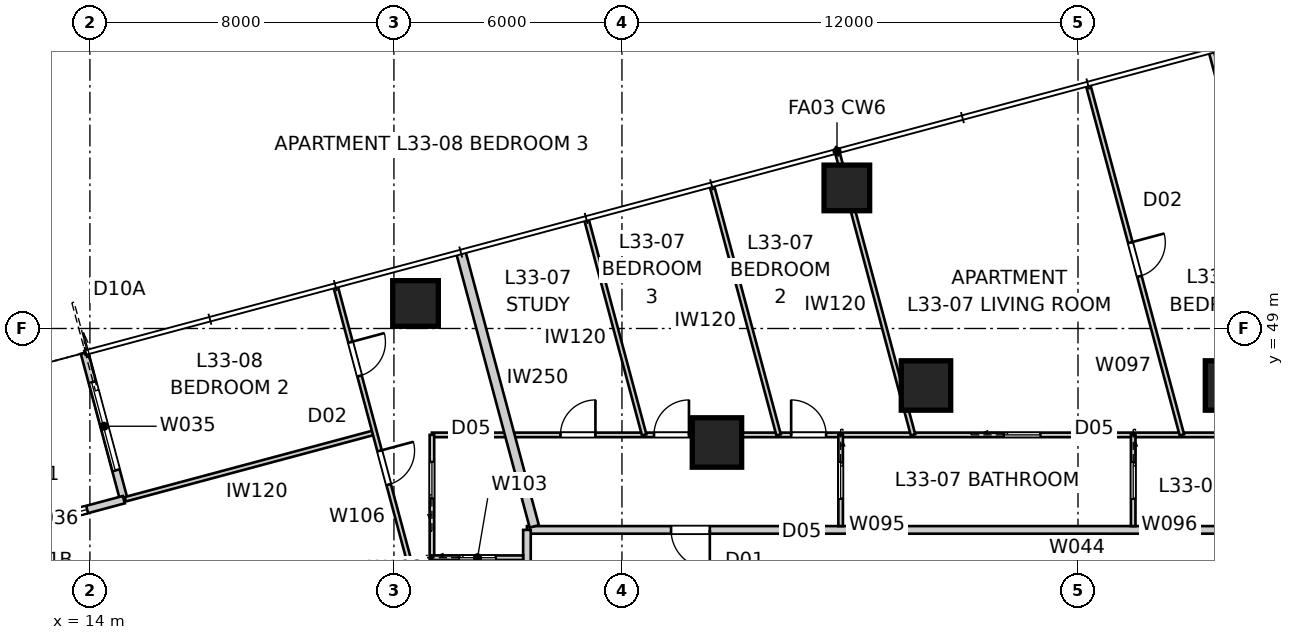
"""IFC4 building model, lengths in metres.
Left out: names, types, materials, properties, quantities, classifications, styles, units other than length and angle.
Written with IfcOpenShell. Run it as: python <this file> out.ifc"""

import sys

from ifc_helpers import new_model, si_unit, direction, frame, frame_2d, origin, origin_2d, place, context, subcontext, project, spatial, rectangle, extrude, element, fill, save


model = new_model("IFC4")
c1 = context("Model", 3, precision=1e-05, world=origin(), true_north=direction((0.0, 1.0)))
c2 = subcontext(c1, "Body", "Model", "MODEL_VIEW")
j1 = project(units=[si_unit("LENGTHUNIT", "METRE"), si_unit("PLANEANGLEUNIT", "RADIAN")], contexts=[c1])
p1 = place(None, origin())
s1 = spatial("IfcSite", under=j1, at=p1, CompositionType="ELEMENT")
p2 = place(p1, origin())
s2 = spatial("IfcBuilding", under=s1, at=p2, CompositionType="ELEMENT")
p3 = place(p2, frame((0.0, 0.0, 121.8)))
s3 = spatial("IfcBuildingStorey", under=s2, at=p3, CompositionType="ELEMENT", Elevation=121.8)
for number, where, z_axis, x_axis in (
    (1, (33.918, 52.699, 0.0), (0.0, 0.0, 1.0), (1.0, 0.0, 0.0)),
    (2, (22.568, 49.658, 0.0), (0.0, 0.0, 1.0), (1.0, 0.0, 0.0)),
):
    element("IfcColumn", number, at=place(p3, frame(where, z_axis=z_axis, x_axis=x_axis)), inside=s3, PredefinedType="COLUMN", context=c2, shape_type="SweptSolid", body=[
        extrude(rectangle(XDim=1.2, YDim=1.2, at=origin_2d()), origin(), (0.0, 0.0, 1.0), 3.4),
    ])
for number, where, z_axis, x_axis in (
    (3, (44.0, 47.5, 0.0), (0.0, 0.0, 1.0), (1.0, 0.0, 0.0)),
    (4, (36.0, 47.5, 0.0), (0.0, 0.0, 1.0), (1.0, 0.0, 0.0)),
    (5, (30.5, 46.0, 0.0), (0.0, 0.0, 1.0), (1.0, 0.0, 0.0)),
):
    element("IfcColumn", number, at=place(p3, frame(where, z_axis=z_axis, x_axis=x_axis)), inside=s3, PredefinedType="COLUMN", context=c2, shape_type="SweptSolid", body=[
        extrude(rectangle(XDim=1.3, YDim=1.3, at=origin_2d()), origin(), (0.0, 0.0, 1.0), 3.4),
    ])
p4 = place(p3, frame((13.857, 48.359, 0.0), z_axis=(0.0, 0.0, 1.0), x_axis=(0.258843877716, -0.965919172068, 0.0)))
e6 = element("IfcWall", 6, at=p4, inside=s3, PredefinedType="SOLIDWALL", context=c2, shape_type="SweptSolid", body=[
    extrude(rectangle(XDim=4.0, YDim=0.2, at=frame_2d((2.0, 0.0))), origin(), (0.0, 0.0, 1.0), 3.25),
])
p5 = place(p4, frame((0.8, 0.0, 0.0)))
e7 = element("IfcOpeningElement", 7, at=p5, cuts=e6, PredefinedType="OPENING", context=c2, shape_type="SweptSolid", body=[
    extrude(rectangle(XDim=2.4, YDim=2.1, at=frame_2d((1.2, 1.05))), frame((0.0, 0.11, 0.0), z_axis=(0.0, -1.0, 0.0), x_axis=(1.0, 0.0, 0.0)), (0.0, 0.0, 1.0), 0.22),
])
p6 = place(p3, frame((14.893, 44.496, 0.0), z_axis=(0.0, 0.0, 1.0), x_axis=(-0.965934430412, -0.258786931944, 0.0)))
e8 = element("IfcWall", 8, at=p6, inside=s3, PredefinedType="SOLIDWALL", context=c2, shape_type="SweptSolid", body=[
    extrude(rectangle(XDim=4.0, YDim=0.2, at=frame_2d((2.0, 0.0))), origin(), (0.0, 0.0, 1.0), 3.25),
])
p7 = place(p6, frame((1.0, 0.0, 0.45)))
e9 = element("IfcOpeningElement", 9, at=p7, cuts=e8, PredefinedType="OPENING", context=c2, shape_type="SweptSolid", body=[
    extrude(rectangle(XDim=2.0, YDim=1.8, at=frame_2d((1.0, 0.9))), frame((0.0, 0.11, 0.0), z_axis=(0.0, -1.0, 0.0), x_axis=(1.0, 0.0, 0.0)), (0.0, 0.0, 1.0), 0.22),
])
p8 = place(p3, frame((52.52, 43.7, 0.0), z_axis=(0.0, 0.0, 1.0), x_axis=(-1.0, 0.0, 0.0)))
e10 = element("IfcWall", 10, at=p8, inside=s3, PredefinedType="PARTITIONING", context=c2, shape_type="SweptSolid", body=[
    extrude(rectangle(XDim=27.02, YDim=0.2, at=frame_2d((13.51, 0.0))), origin(), (0.0, 0.0, 1.0), 3.25),
])
p9 = place(p8, frame((22.208, 0.0, 0.0)))
e11 = element("IfcOpeningElement", 11, at=p9, cuts=e10, PredefinedType="OPENING", context=c2, shape_type="SweptSolid", body=[
    extrude(rectangle(XDim=1.02, YDim=2.34, at=frame_2d((0.51, 1.17))), frame((0.0, 0.11, 0.0), z_axis=(0.0, -1.0, 0.0), x_axis=(1.0, 0.0, 0.0)), (0.0, 0.0, 1.0), 0.22),
])
p10 = place(p8, frame((1.856, 0.0, 0.0)))
e12 = element("IfcOpeningElement", 12, at=p10, cuts=e10, PredefinedType="OPENING", context=c2, shape_type="SweptSolid", body=[
    extrude(rectangle(XDim=1.02, YDim=2.34, at=frame_2d((0.51, 1.17))), frame((0.0, 0.11, 0.0), z_axis=(0.0, -1.0, 0.0), x_axis=(1.0, 0.0, 0.0)), (0.0, 0.0, 1.0), 0.22),
])
p11 = place(p3, frame((25.5, 43.7, 0.0), z_axis=(0.0, 0.0, 1.0), x_axis=(0.0, -1.0, 0.0)))
e13 = element("IfcWall", 13, at=p11, inside=s3, PredefinedType="PARTITIONING", context=c2, shape_type="SweptSolid", body=[
    extrude(rectangle(XDim=28.2, YDim=0.2, at=frame_2d((14.1, 0.0))), origin(), (0.0, 0.0, 1.0), 3.25),
])
p12 = place(p11, frame((8.742, 0.0, 0.0)))
e14 = element("IfcOpeningElement", 14, at=p12, cuts=e13, PredefinedType="OPENING", context=c2, shape_type="SweptSolid", body=[
    extrude(rectangle(XDim=1.02, YDim=2.34, at=frame_2d((0.51, 1.17))), frame((0.0, 0.11, 0.0), z_axis=(0.0, -1.0, 0.0), x_axis=(1.0, 0.0, 0.0)), (0.0, 0.0, 1.0), 0.22),
])
p13 = place(p11, frame((1.808, 0.0, 0.0)))
e15 = element("IfcOpeningElement", 15, at=p13, cuts=e13, PredefinedType="OPENING", context=c2, shape_type="SweptSolid", body=[
    extrude(rectangle(XDim=1.02, YDim=2.1, at=frame_2d((0.51, 1.05))), frame((0.0, 0.11, 0.0), z_axis=(0.0, -1.0, 0.0), x_axis=(1.0, 0.0, 0.0)), (0.0, 0.0, 1.0), 0.22),
])
p14 = place(p3, frame((43.56, 56.318, 0.0), z_axis=(0.0, 0.0, 1.0), x_axis=(0.258822671559, -0.965924854576, 0.0)))
e16 = element("IfcWall", 16, at=p14, inside=s3, PredefinedType="PARTITIONING", context=c2, shape_type="SweptSolid", body=[
    extrude(rectangle(XDim=12.966, YDim=0.25, at=frame_2d((6.483, 0.0))), origin(), (0.0, 0.0, 1.0), 3.25),
])
p15 = place(p3, frame((23.758, 51.012, 0.0), z_axis=(0.0, 0.0, 1.0), x_axis=(0.258805213744, -0.965929532284, 0.0)))
e17 = element("IfcWall", 17, at=p15, inside=s3, PredefinedType="PARTITIONING", context=c2, shape_type="SweptSolid", body=[
    extrude(rectangle(XDim=7.473, YDim=0.25, at=frame_2d((3.737, 0.0))), origin(), (0.0, 0.0, 1.0), 3.25),
])
p16 = place(p3, frame((23.0, 46.2, 0.0), z_axis=(0.0, 0.0, 1.0), x_axis=(1.0, 0.0, 0.0)))
e18 = element("IfcWall", 18, at=p16, inside=s3, PredefinedType="PARTITIONING", context=c2, shape_type="SweptSolid", body=[
    extrude(rectangle(XDim=33.2, YDim=0.12, at=frame_2d((16.6, 0.0))), origin(), (0.0, 0.0, 1.0), 2.55),
])
p17 = place(p16, frame((5.844, 0.0, 0.0)))
e19 = element("IfcOpeningElement", 19, at=p17, cuts=e18, PredefinedType="OPENING", context=c2, shape_type="SweptSolid", body=[
    extrude(rectangle(XDim=0.92, YDim=2.34, at=frame_2d((0.46, 1.17))), frame((0.0, 0.07, 0.0), z_axis=(0.0, -1.0, 0.0), x_axis=(1.0, 0.0, 0.0)), (0.0, 0.0, 1.0), 0.14),
])
p18 = place(p16, frame((3.382, 0.0, 0.0)))
e20 = element("IfcOpeningElement", 20, at=p18, cuts=e18, PredefinedType="OPENING", context=c2, shape_type="SweptSolid", body=[
    extrude(rectangle(XDim=0.92, YDim=2.34, at=frame_2d((0.46, 1.17))), frame((0.0, 0.07, 0.0), z_axis=(0.0, -1.0, 0.0), x_axis=(1.0, 0.0, 0.0)), (0.0, 0.0, 1.0), 0.14),
])
p19 = place(p16, frame((9.452, 0.0, 0.0)))
e21 = element("IfcOpeningElement", 21, at=p19, cuts=e18, PredefinedType="OPENING", context=c2, shape_type="SweptSolid", body=[
    extrude(rectangle(XDim=0.92, YDim=2.34, at=frame_2d((0.46, 1.17))), frame((0.0, 0.07, 0.0), z_axis=(0.0, -1.0, 0.0), x_axis=(1.0, 0.0, 0.0)), (0.0, 0.0, 1.0), 0.14),
])
p20 = place(p16, frame((27.775, 0.0, 0.0)))
e22 = element("IfcOpeningElement", 22, at=p20, cuts=e18, PredefinedType="OPENING", context=c2, shape_type="SweptSolid", body=[
    extrude(rectangle(XDim=0.92, YDim=2.34, at=frame_2d((0.46, 1.17))), frame((0.0, 0.07, 0.0), z_axis=(0.0, -1.0, 0.0), x_axis=(1.0, 0.0, 0.0)), (0.0, 0.0, 1.0), 0.14),
])
p21 = place(p16, frame((15.05, 0.0, 0.0)))
e23 = element("IfcOpeningElement", 23, at=p21, cuts=e18, PredefinedType="OPENING", context=c2, shape_type="SweptSolid", body=[
    extrude(rectangle(XDim=0.96, YDim=2.1, at=frame_2d((0.48, 1.05))), frame((0.0, 0.07, 0.0), z_axis=(0.0, -1.0, 0.0), x_axis=(1.0, 0.0, 0.0)), (0.0, 0.0, 1.0), 0.14),
])
p22 = place(p3, frame((33.754, 46.2, 0.0), z_axis=(0.0, 0.0, 1.0), x_axis=(0.0, -1.0, 0.0)))
e24 = element("IfcWall", 24, at=p22, inside=s3, PredefinedType="PARTITIONING", context=c2, shape_type="SweptSolid", body=[
    extrude(rectangle(XDim=2.4, YDim=0.12, at=frame_2d((1.2, 0.0))), origin(), (0.0, 0.0, 1.0), 3.25),
])
p23 = place(p22, frame((0.72, 0.0, 0.0)))
e25 = element("IfcOpeningElement", 25, at=p23, cuts=e24, PredefinedType="OPENING", context=c2, shape_type="SweptSolid", body=[
    extrude(rectangle(XDim=0.96, YDim=2.1, at=frame_2d((0.48, 1.05))), frame((0.0, 0.07, 0.0), z_axis=(0.0, -1.0, 0.0), x_axis=(1.0, 0.0, 0.0)), (0.0, 0.0, 1.0), 0.14),
])
p24 = place(p3, frame((41.453, 46.2, 0.0), z_axis=(0.0, 0.0, 1.0), x_axis=(0.0, -1.0, 0.0)))
e26 = element("IfcWall", 26, at=p24, inside=s3, PredefinedType="PARTITIONING", context=c2, shape_type="SweptSolid", body=[
    extrude(rectangle(XDim=2.4, YDim=0.12, at=frame_2d((1.2, 0.0))), origin(), (0.0, 0.0, 1.0), 3.25),
])
p25 = place(p24, frame((0.72, 0.0, 0.0)))
e27 = element("IfcOpeningElement", 27, at=p25, cuts=e26, PredefinedType="OPENING", context=c2, shape_type="SweptSolid", body=[
    extrude(rectangle(XDim=0.96, YDim=2.1, at=frame_2d((0.48, 1.05))), frame((0.0, 0.07, 0.0), z_axis=(0.0, -1.0, 0.0), x_axis=(1.0, 0.0, 0.0)), (0.0, 0.0, 1.0), 0.14),
])
p26 = place(p3, frame((40.27, 55.395, 0.0), z_axis=(0.0, 0.0, 1.0), x_axis=(0.25881812666, -0.965926072385, 0.0)))
e28 = element("IfcWall", 28, at=p26, inside=s3, PredefinedType="PARTITIONING", context=c2, shape_type="SweptSolid", body=[
    extrude(rectangle(XDim=9.52, YDim=0.12, at=frame_2d((4.76, 0.0))), origin(), (0.0, 0.0, 1.0), 3.25),
])
p27 = place(p26, frame((4.28, 0.0, 0.0)))
e29 = element("IfcOpeningElement", 29, at=p27, cuts=e28, PredefinedType="OPENING", context=c2, shape_type="SweptSolid", body=[
    extrude(rectangle(XDim=0.92, YDim=2.34, at=frame_2d((0.46, 1.17))), frame((0.0, 0.07, 0.0), z_axis=(0.0, -1.0, 0.0), x_axis=(1.0, 0.0, 0.0)), (0.0, 0.0, 1.0), 0.14),
])
p28 = place(p3, frame((35.659, 46.2, 0.0), z_axis=(0.0, 0.0, 1.0), x_axis=(-0.258826555959, 0.96592381373, 0.0)))
e30 = element("IfcWall", 30, at=p28, inside=s3, PredefinedType="PARTITIONING", context=c2, shape_type="SweptSolid", body=[
    extrude(rectangle(XDim=7.688, YDim=0.12, at=frame_2d((3.844, 0.0))), origin(), (0.0, 0.0, 1.0), 3.25),
])
p29 = place(p3, frame((32.122, 46.2, 0.0), z_axis=(0.0, 0.0, 1.0), x_axis=(-0.258811158187, 0.965927939547, 0.0)))
e31 = element("IfcWall", 31, at=p29, inside=s3, PredefinedType="PARTITIONING", context=c2, shape_type="SweptSolid", body=[
    extrude(rectangle(XDim=6.773, YDim=0.12, at=frame_2d((3.386, 0.0))), origin(), (0.0, 0.0, 1.0), 3.25),
])
p30 = place(p3, frame((28.585, 46.2, 0.0), z_axis=(0.0, 0.0, 1.0), x_axis=(-0.258790947109, 0.965933354686, 0.0)))
e32 = element("IfcWall", 32, at=p30, inside=s3, PredefinedType="PARTITIONING", context=c2, shape_type="SweptSolid", body=[
    extrude(rectangle(XDim=5.857, YDim=0.12, at=frame_2d((2.929, 0.0))), origin(), (0.0, 0.0, 1.0), 3.25),
])
p31 = place(p3, frame((23.0, 28.93, 0.0), z_axis=(0.0, 0.0, 1.0), x_axis=(0.0, 1.0, 0.0)))
e33 = element("IfcWall", 33, at=p31, inside=s3, PredefinedType="PARTITIONING", context=c2, shape_type="SweptSolid", body=[
    extrude(rectangle(XDim=17.27, YDim=0.12, at=frame_2d((8.635, 0.0))), origin(), (0.0, 0.0, 1.0), 2.55),
])
p32 = place(p31, frame((5.772, 0.0, 0.0)))
e34 = element("IfcOpeningElement", 34, at=p32, cuts=e33, PredefinedType="OPENING", context=c2, shape_type="SweptSolid", body=[
    extrude(rectangle(XDim=0.92, YDim=2.34, at=frame_2d((0.46, 1.17))), frame((0.0, 0.07, 0.0), z_axis=(0.0, -1.0, 0.0), x_axis=(1.0, 0.0, 0.0)), (0.0, 0.0, 1.0), 0.14),
])
p33 = place(p31, frame((15.599, 0.0, 0.0)))
e35 = element("IfcOpeningElement", 35, at=p33, cuts=e33, PredefinedType="OPENING", context=c2, shape_type="SweptSolid", body=[
    extrude(rectangle(XDim=0.96, YDim=2.1, at=frame_2d((0.48, 1.05))), frame((0.0, 0.07, 0.0), z_axis=(0.0, -1.0, 0.0), x_axis=(1.0, 0.0, 0.0)), (0.0, 0.0, 1.0), 0.14),
])
p34 = place(p31, frame((8.441, 0.0, 0.0)))
e36 = element("IfcOpeningElement", 36, at=p34, cuts=e33, PredefinedType="OPENING", context=c2, shape_type="SweptSolid", body=[
    extrude(rectangle(XDim=0.96, YDim=2.1, at=frame_2d((0.48, 1.05))), frame((0.0, 0.07, 0.0), z_axis=(0.0, -1.0, 0.0), x_axis=(1.0, 0.0, 0.0)), (0.0, 0.0, 1.0), 0.14),
])
p35 = place(p3, frame((23.0, 42.968, 0.0), z_axis=(0.0, 0.0, 1.0), x_axis=(1.0, 0.0, 0.0)))
e37 = element("IfcWall", 37, at=p35, inside=s3, PredefinedType="PARTITIONING", context=c2, shape_type="SweptSolid", body=[
    extrude(rectangle(XDim=2.4, YDim=0.12, at=frame_2d((1.2, 0.0))), origin(), (0.0, 0.0, 1.0), 3.25),
])
p36 = place(p35, frame((0.72, 0.0, 0.0)))
e38 = element("IfcOpeningElement", 38, at=p36, cuts=e37, PredefinedType="OPENING", context=c2, shape_type="SweptSolid", body=[
    extrude(rectangle(XDim=0.96, YDim=2.1, at=frame_2d((0.48, 1.05))), frame((0.0, 0.07, 0.0), z_axis=(0.0, -1.0, 0.0), x_axis=(1.0, 0.0, 0.0)), (0.0, 0.0, 1.0), 0.14),
])
p37 = place(p3, frame((14.931, 44.506, 0.0), z_axis=(0.0, 0.0, 1.0), x_axis=(0.965922865286, 0.258830095464, 0.0)))
e39 = element("IfcWall", 39, at=p37, inside=s3, PredefinedType="PARTITIONING", context=c2, shape_type="SweptSolid", body=[
    extrude(rectangle(XDim=6.793, YDim=0.12, at=frame_2d((3.396, 0.0))), origin(), (0.0, 0.0, 1.0), 3.25),
])
p38 = place(p3, frame((20.468, 50.089, 0.0), z_axis=(0.0, 0.0, 1.0), x_axis=(0.25881390457, -0.965927203676, 0.0)))
e40 = element("IfcWall", 40, at=p38, inside=s3, PredefinedType="PARTITIONING", context=c2, shape_type="SweptSolid", body=[
    extrude(rectangle(XDim=9.357, YDim=0.12, at=frame_2d((4.678, 0.0))), origin(), (0.0, 0.0, 1.0), 2.638),
])
p39 = place(p38, frame((4.461, 0.0, 0.0)))
e41 = element("IfcOpeningElement", 41, at=p39, cuts=e40, PredefinedType="OPENING", context=c2, shape_type="SweptSolid", body=[
    extrude(rectangle(XDim=0.92, YDim=2.34, at=frame_2d((0.46, 1.17))), frame((0.0, 0.07, 0.0), z_axis=(0.0, -1.0, 0.0), x_axis=(1.0, 0.0, 0.0)), (0.0, 0.0, 1.0), 0.14),
])
p40 = place(p38, frame((1.5, 0.0, 0.0)))
e42 = element("IfcOpeningElement", 42, at=p40, cuts=e40, PredefinedType="OPENING", context=c2, shape_type="SweptSolid", body=[
    extrude(rectangle(XDim=0.92, YDim=2.34, at=frame_2d((0.46, 1.17))), frame((0.0, 0.07, 0.0), z_axis=(0.0, -1.0, 0.0), x_axis=(1.0, 0.0, 0.0)), (0.0, 0.0, 1.0), 0.14),
])
p41 = place(p5, origin())
e43 = element("IfcDoor", 43, at=p41, inside=s3, OperationType="SLIDING_TO_LEFT", PredefinedType="DOOR", context=c2, shape_type="SweptSolid", body=[
    extrude(rectangle(XDim=2.4, YDim=2.1, at=frame_2d((1.2, 1.05))), frame((0.0, 0.025, 0.0), z_axis=(0.0, -1.0, 0.0), x_axis=(1.0, 0.0, 0.0)), (0.0, 0.0, 1.0), 0.05),
])
fill(e7, e43)
p42 = place(p7, origin())
e44 = element("IfcWindow", 44, at=p42, inside=s3, PartitioningType="SINGLE_PANEL", PredefinedType="WINDOW", context=c2, shape_type="SweptSolid", body=[
    extrude(rectangle(XDim=2.0, YDim=1.8, at=frame_2d((1.0, 0.9))), frame((0.0, 0.03, 0.0), z_axis=(0.0, -1.0, 0.0), x_axis=(1.0, 0.0, 0.0)), (0.0, 0.0, 1.0), 0.06),
])
fill(e9, e44)
p43 = place(p9, origin())
e45 = element("IfcDoor", 45, at=p43, inside=s3, OperationType="SINGLE_SWING_LEFT", PredefinedType="DOOR", context=c2, shape_type="SweptSolid", body=[
    extrude(rectangle(XDim=1.02, YDim=2.34, at=frame_2d((0.51, 1.17))), frame((0.0, 0.025, 0.0), z_axis=(0.0, -1.0, 0.0), x_axis=(1.0, 0.0, 0.0)), (0.0, 0.0, 1.0), 0.05),
])
fill(e11, e45)
p44 = place(p17, origin())
e46 = element("IfcDoor", 46, at=p44, inside=s3, OperationType="SINGLE_SWING_RIGHT", PredefinedType="DOOR", context=c2, shape_type="SweptSolid", body=[
    extrude(rectangle(XDim=0.92, YDim=2.34, at=frame_2d((0.46, 1.17))), frame((0.0, 0.025, 0.0), z_axis=(0.0, -1.0, 0.0), x_axis=(1.0, 0.0, 0.0)), (0.0, 0.0, 1.0), 0.05),
])
fill(e19, e46)
p45 = place(p18, origin())
e47 = element("IfcDoor", 47, at=p45, inside=s3, OperationType="SINGLE_SWING_RIGHT", PredefinedType="DOOR", context=c2, shape_type="SweptSolid", body=[
    extrude(rectangle(XDim=0.92, YDim=2.34, at=frame_2d((0.46, 1.17))), frame((0.0, 0.025, 0.0), z_axis=(0.0, -1.0, 0.0), x_axis=(1.0, 0.0, 0.0)), (0.0, 0.0, 1.0), 0.05),
])
fill(e20, e47)
p46 = place(p23, origin())
e48 = element("IfcDoor", 48, at=p46, inside=s3, OperationType="SLIDING_TO_LEFT", PredefinedType="DOOR", context=c2, shape_type="SweptSolid", body=[
    extrude(rectangle(XDim=0.96, YDim=2.1, at=frame_2d((0.48, 1.05))), frame((0.0, 0.025, 0.0), z_axis=(0.0, -1.0, 0.0), x_axis=(1.0, 0.0, 0.0)), (0.0, 0.0, 1.0), 0.05),
])
fill(e25, e48)
p47 = place(p19, origin())
e49 = element("IfcDoor", 49, at=p47, inside=s3, OperationType="SINGLE_SWING_LEFT", PredefinedType="DOOR", context=c2, shape_type="SweptSolid", body=[
    extrude(rectangle(XDim=0.92, YDim=2.34, at=frame_2d((0.46, 1.17))), frame((0.0, 0.025, 0.0), z_axis=(0.0, -1.0, 0.0), x_axis=(1.0, 0.0, 0.0)), (0.0, 0.0, 1.0), 0.05),
])
fill(e21, e49)
p48 = place(p36, origin())
e50 = element("IfcDoor", 50, at=p48, inside=s3, OperationType="SLIDING_TO_LEFT", PredefinedType="DOOR", context=c2, shape_type="SweptSolid", body=[
    extrude(rectangle(XDim=0.96, YDim=2.1, at=frame_2d((0.48, 1.05))), frame((0.0, 0.025, 0.0), z_axis=(0.0, -1.0, 0.0), x_axis=(1.0, 0.0, 0.0)), (0.0, 0.0, 1.0), 0.05),
])
fill(e38, e50)
p49 = place(p21, origin())
e51 = element("IfcDoor", 51, at=p49, inside=s3, OperationType="SLIDING_TO_LEFT", PredefinedType="DOOR", context=c2, shape_type="SweptSolid", body=[
    extrude(rectangle(XDim=0.96, YDim=2.1, at=frame_2d((0.48, 1.05))), frame((0.0, 0.025, 0.0), z_axis=(0.0, -1.0, 0.0), x_axis=(1.0, 0.0, 0.0)), (0.0, 0.0, 1.0), 0.05),
])
fill(e23, e51)
p50 = place(p25, origin())
e52 = element("IfcDoor", 52, at=p50, inside=s3, OperationType="SLIDING_TO_LEFT", PredefinedType="DOOR", context=c2, shape_type="SweptSolid", body=[
    extrude(rectangle(XDim=0.96, YDim=2.1, at=frame_2d((0.48, 1.05))), frame((0.0, 0.025, 0.0), z_axis=(0.0, -1.0, 0.0), x_axis=(1.0, 0.0, 0.0)), (0.0, 0.0, 1.0), 0.05),
])
fill(e27, e52)
p51 = place(p33, origin())
e53 = element("IfcDoor", 53, at=p51, inside=s3, OperationType="SLIDING_TO_LEFT", PredefinedType="DOOR", context=c2, shape_type="SweptSolid", body=[
    extrude(rectangle(XDim=0.96, YDim=2.1, at=frame_2d((0.48, 1.05))), frame((0.0, 0.025, 0.0), z_axis=(0.0, -1.0, 0.0), x_axis=(1.0, 0.0, 0.0)), (0.0, 0.0, 1.0), 0.05),
])
fill(e35, e53)
p52 = place(p27, origin())
e54 = element("IfcDoor", 54, at=p52, inside=s3, OperationType="SINGLE_SWING_LEFT", PredefinedType="DOOR", context=c2, shape_type="SweptSolid", body=[
    extrude(rectangle(XDim=0.92, YDim=2.34, at=frame_2d((0.46, 1.17))), frame((0.0, 0.025, 0.0), z_axis=(0.0, -1.0, 0.0), x_axis=(1.0, 0.0, 0.0)), (0.0, 0.0, 1.0), 0.05),
])
fill(e29, e54)
p53 = place(p39, origin())
e55 = element("IfcDoor", 55, at=p53, inside=s3, OperationType="SINGLE_SWING_LEFT", PredefinedType="DOOR", context=c2, shape_type="SweptSolid", body=[
    extrude(rectangle(XDim=0.92, YDim=2.34, at=frame_2d((0.46, 1.17))), frame((0.0, 0.025, 0.0), z_axis=(0.0, -1.0, 0.0), x_axis=(1.0, 0.0, 0.0)), (0.0, 0.0, 1.0), 0.05),
])
fill(e41, e55)
p54 = place(p40, origin())
e56 = element("IfcDoor", 56, at=p54, inside=s3, OperationType="SINGLE_SWING_LEFT", PredefinedType="DOOR", context=c2, shape_type="SweptSolid", body=[
    extrude(rectangle(XDim=0.92, YDim=2.34, at=frame_2d((0.46, 1.17))), frame((0.0, 0.025, 0.0), z_axis=(0.0, -1.0, 0.0), x_axis=(1.0, 0.0, 0.0)), (0.0, 0.0, 1.0), 0.05),
])
fill(e42, e56)
save(model, sys.argv[1])
